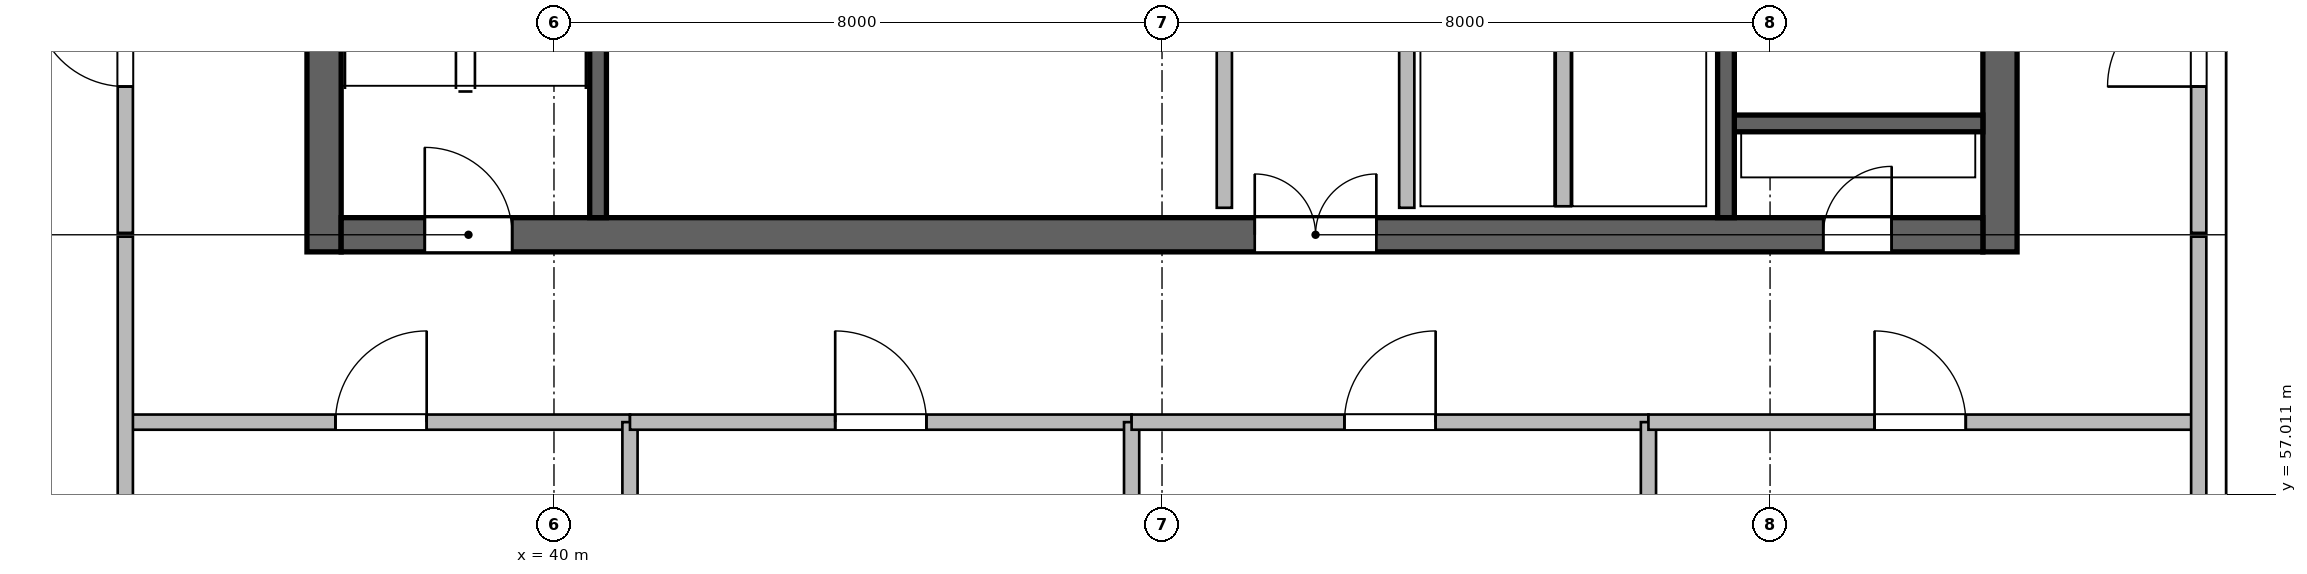
"""IFC4 building model, lengths in metres.
Left out: names, types, materials, properties, quantities, classifications, styles, units other than length and angle.
Written with IfcOpenShell. Run it as: python <this file> out.ifc"""

import sys

from ifc_helpers import new_model, si_unit, direction, frame, frame_2d, origin, place, context, subcontext, project, spatial, rectangle, extrude, source, transform, mapped, element, fill, save


model = new_model("IFC4")
c1 = context("Model", 3, precision=1e-05, world=origin(), true_north=direction((0.0, 1.0)))
c2 = subcontext(c1, "Body", "Model", "MODEL_VIEW")
j1 = project(units=[si_unit("LENGTHUNIT", "METRE"), si_unit("PLANEANGLEUNIT", "RADIAN")], contexts=[c1])
p1 = place(None, origin())
s1 = spatial("IfcSite", under=j1, at=p1, CompositionType="ELEMENT")
p2 = place(p1, origin())
s2 = spatial("IfcBuilding", under=s1, at=p2, CompositionType="ELEMENT")
p3 = place(p2, frame((0.0, 0.0, 189.6)))
s3 = spatial("IfcBuildingStorey", under=s2, at=p3, CompositionType="ELEMENT", Elevation=189.6)
m1 = source(origin(), c2, "Body", "SweptSolid", [
    extrude(rectangle(XDim=12.0, YDim=0.45, at=frame_2d((6.0, 0.0))), origin(), (0.0, 0.0, 1.0), 4.8),
])
for number, where, z_axis, x_axis in (
    (1, (36.975, 60.2, 0.0), (0.0, 0.0, 1.0), (0.0, 1.0, 0.0)),
    (2, (59.025, 60.2, 0.0), (0.0, 0.0, 1.0), (0.0, 1.0, 0.0)),
):
    element("IfcWall", number, at=place(p3, frame(where, z_axis=z_axis, x_axis=x_axis)), inside=s3, PredefinedType="SHEAR", context=c2, shape_type="MappedRepresentation", body=[
        mapped(m1, transform((0.0, 0.0, 0.0), scale=1.0)),
    ])
m2 = source(origin(), c2, "Body", "SweptSolid", [
    extrude(rectangle(XDim=21.6, YDim=0.45, at=frame_2d((10.8, 0.0))), origin(), (0.0, 0.0, 1.0), 4.8),
])
p4 = place(p3, frame((37.2, 60.425, 0.0), z_axis=(0.0, 0.0, 1.0), x_axis=(1.0, 0.0, 0.0)))
e3 = element("IfcWall", 3, at=p4, inside=s3, PredefinedType="SHEAR", context=c2, shape_type="MappedRepresentation", body=[
    mapped(m2, transform((0.0, 0.0, 0.0), scale=1.0)),
])
p5 = place(p4, frame((1.1, 0.0, 0.0)))
e4 = element("IfcOpeningElement", 4, at=p5, cuts=e3, PredefinedType="OPENING", context=c2, shape_type="SweptSolid", body=[
    extrude(rectangle(XDim=1.15, YDim=2.15, at=frame_2d((0.575, 1.075))), frame((0.0, 0.235, 0.0), z_axis=(0.0, -1.0, 0.0), x_axis=(1.0, 0.0, 0.0)), (0.0, 0.0, 1.0), 0.47),
])
p6 = place(p4, frame((19.5, 0.0, 0.0)))
e5 = element("IfcOpeningElement", 5, at=p6, cuts=e3, PredefinedType="OPENING", context=c2, shape_type="SweptSolid", body=[
    extrude(rectangle(XDim=0.9, YDim=2.1, at=frame_2d((0.45, 1.05))), frame((0.0, 0.235, 0.0), z_axis=(0.0, -1.0, 0.0), x_axis=(1.0, 0.0, 0.0)), (0.0, 0.0, 1.0), 0.47),
])
p7 = place(p4, frame((12.02, 0.0, 0.0)))
e6 = element("IfcOpeningElement", 6, at=p7, cuts=e3, PredefinedType="OPENING", context=c2, shape_type="SweptSolid", body=[
    extrude(rectangle(XDim=1.6, YDim=2.15, at=frame_2d((0.8, 1.075))), frame((0.0, 0.235, 0.0), z_axis=(0.0, -1.0, 0.0), x_axis=(1.0, 0.0, 0.0)), (0.0, 0.0, 1.0), 0.47),
])
m3 = source(origin(), c2, "Body", "SweptSolid", [
    extrude(rectangle(XDim=3.27, YDim=0.22, at=frame_2d((1.635, 0.0))), origin(), (0.0, 0.0, 1.0), 4.8),
])
p8 = place(p3, frame((55.53, 61.89, 0.0), z_axis=(0.0, 0.0, 1.0), x_axis=(1.0, 0.0, 0.0)))
e7 = element("IfcWall", 7, at=p8, inside=s3, PredefinedType="SHEAR", context=c2, shape_type="MappedRepresentation", body=[
    mapped(m3, transform((0.0, 0.0, 0.0), scale=1.0)),
])
m4 = source(origin(), c2, "Body", "SweptSolid", [
    extrude(rectangle(XDim=11.1, YDim=0.22, at=frame_2d((5.55, 0.0))), origin(), (0.0, 0.0, 1.0), 4.8),
])
p9 = place(p3, frame((40.58, 60.65, 0.0), z_axis=(0.0, 0.0, 1.0), x_axis=(0.0, 1.0, 0.0)))
e8 = element("IfcWall", 8, at=p9, inside=s3, PredefinedType="SHEAR", context=c2, shape_type="MappedRepresentation", body=[
    mapped(m4, transform((0.0, 0.0, 0.0), scale=1.0)),
])
p10 = place(p3, frame((55.42, 60.65, 0.0), z_axis=(0.0, 0.0, 1.0), x_axis=(0.0, 1.0, 0.0)))
e9 = element("IfcWall", 9, at=p10, inside=s3, PredefinedType="SHEAR", context=c2, shape_type="MappedRepresentation", body=[
    mapped(m4, transform((0.0, 0.0, 0.0), scale=1.0)),
])
p11 = place(p10, frame((9.595, 0.0, 0.0)))
e10 = element("IfcOpeningElement", 10, at=p11, cuts=e9, PredefinedType="OPENING", context=c2, shape_type="SweptSolid", body=[
    extrude(rectangle(XDim=1.15, YDim=2.15, at=frame_2d((0.575, 1.075))), frame((0.0, 0.12, 0.0), z_axis=(0.0, -1.0, 0.0), x_axis=(1.0, 0.0, 0.0)), (0.0, 0.0, 1.0), 0.24),
])
m5 = source(origin(), c2, "Body", "SweptSolid", [
    extrude(rectangle(XDim=2.24, YDim=0.2, at=frame_2d((1.12, 0.0))), origin(), (0.0, 0.0, 1.0), 4.48),
])
for number, where, z_axis, x_axis in (
    (11, (48.82, 60.78, 0.0), (0.0, 0.0, 1.0), (0.0, 1.0, 0.0)),
    (12, (51.22, 60.78, 0.0), (0.0, 0.0, 1.0), (0.0, 1.0, 0.0)),
):
    element("IfcWall", number, at=place(p3, frame(where, z_axis=z_axis, x_axis=x_axis)), inside=s3, PredefinedType="SOLIDWALL", context=c2, shape_type="MappedRepresentation", body=[
        mapped(m5, transform((0.0, 0.0, 0.0), scale=1.0)),
    ])
m6 = source(origin(), c2, "Body", "SweptSolid", [
    extrude(rectangle(XDim=2.2, YDim=0.2, at=frame_2d((1.1, 0.0))), origin(), (0.0, 0.0, 1.0), 4.48),
])
p12 = place(p3, frame((53.28, 60.8, 0.0), z_axis=(0.0, 0.0, 1.0), x_axis=(0.0, 1.0, 0.0)))
e13 = element("IfcWall", 13, at=p12, inside=s3, PredefinedType="SOLIDWALL", context=c2, shape_type="MappedRepresentation", body=[
    mapped(m6, transform((0.0, 0.0, 0.0), scale=1.0)),
])
m7 = source(origin(), c2, "Body", "SweptSolid", [
    extrude(rectangle(XDim=6.55, YDim=0.2, at=frame_2d((3.275, 0.0))), origin(), (0.0, 0.0, 1.0), 4.48),
])
p13 = place(p3, frame((34.45, 57.96, 0.0), z_axis=(0.0, 0.0, 1.0), x_axis=(1.0, 0.0, 0.0)))
e14 = element("IfcWall", 14, at=p13, inside=s3, PredefinedType="SOLIDWALL", context=c2, shape_type="MappedRepresentation", body=[
    mapped(m7, transform((0.0, 0.0, 0.0), scale=1.0)),
])
p14 = place(p13, frame((2.675, 0.0, 0.0)))
e15 = element("IfcOpeningElement", 15, at=p14, cuts=e14, PredefinedType="OPENING", context=c2, shape_type="SweptSolid", body=[
    extrude(rectangle(XDim=1.2, YDim=2.15, at=frame_2d((0.6, 1.075))), frame((0.0, 0.11, 0.0), z_axis=(0.0, -1.0, 0.0), x_axis=(1.0, 0.0, 0.0)), (0.0, 0.0, 1.0), 0.22),
])
m8 = source(origin(), c2, "Body", "SweptSolid", [
    extrude(rectangle(XDim=5.562, YDim=0.2, at=frame_2d((2.781, 0.0))), origin(), (0.0, 0.0, 1.0), 4.48),
])
p15 = place(p3, frame((41.0, 52.398, 0.0), z_axis=(0.0, 0.0, 1.0), x_axis=(0.0, 1.0, 0.0)))
e16 = element("IfcWall", 16, at=p15, inside=s3, PredefinedType="SOLIDWALL", context=c2, shape_type="MappedRepresentation", body=[
    mapped(m8, transform((0.0, 0.0, 0.0), scale=1.0)),
])
m9 = source(origin(), c2, "Body", "SweptSolid", [
    extrude(rectangle(XDim=6.6, YDim=0.2, at=frame_2d((3.3, 0.0))), origin(), (0.0, 0.0, 1.0), 3.925),
])
p16 = place(p3, frame((41.0, 57.96, 0.0), z_axis=(0.0, 0.0, 1.0), x_axis=(1.0, 0.0, 0.0)))
e17 = element("IfcWall", 17, at=p16, inside=s3, PredefinedType="SOLIDWALL", context=c2, shape_type="MappedRepresentation", body=[
    mapped(m9, transform((0.0, 0.0, 0.0), scale=1.0)),
])
p17 = place(p16, frame((2.7, 0.0, 0.0)))
e18 = element("IfcOpeningElement", 18, at=p17, cuts=e17, PredefinedType="OPENING", context=c2, shape_type="SweptSolid", body=[
    extrude(rectangle(XDim=1.2, YDim=2.15, at=frame_2d((0.6, 1.075))), frame((0.0, 0.11, 0.0), z_axis=(0.0, -1.0, 0.0), x_axis=(1.0, 0.0, 0.0)), (0.0, 0.0, 1.0), 0.22),
])
m10 = source(origin(), c2, "Body", "SweptSolid", [
    extrude(rectangle(XDim=4.173, YDim=0.2, at=frame_2d((2.086, 0.0))), origin(), (0.0, 0.0, 1.0), 4.48),
])
p18 = place(p3, frame((47.6, 53.787, 0.0), z_axis=(0.0, 0.0, 1.0), x_axis=(0.0, 1.0, 0.0)))
e19 = element("IfcWall", 19, at=p18, inside=s3, PredefinedType="SOLIDWALL", context=c2, shape_type="MappedRepresentation", body=[
    mapped(m10, transform((0.0, 0.0, 0.0), scale=1.0)),
])
m11 = source(origin(), c2, "Body", "SweptSolid", [
    extrude(rectangle(XDim=6.8, YDim=0.2, at=frame_2d((3.4, 0.0))), origin(), (0.0, 0.0, 1.0), 3.925),
])
p19 = place(p3, frame((47.6, 57.96, 0.0), z_axis=(0.0, 0.0, 1.0), x_axis=(1.0, 0.0, 0.0)))
e20 = element("IfcWall", 20, at=p19, inside=s3, PredefinedType="SOLIDWALL", context=c2, shape_type="MappedRepresentation", body=[
    mapped(m11, transform((0.0, 0.0, 0.0), scale=1.0)),
])
p20 = place(p19, frame((2.8, 0.0, 0.0)))
e21 = element("IfcOpeningElement", 21, at=p20, cuts=e20, PredefinedType="OPENING", context=c2, shape_type="SweptSolid", body=[
    extrude(rectangle(XDim=1.2, YDim=2.15, at=frame_2d((0.6, 1.075))), frame((0.0, 0.11, 0.0), z_axis=(0.0, -1.0, 0.0), x_axis=(1.0, 0.0, 0.0)), (0.0, 0.0, 1.0), 0.22),
])
m12 = source(origin(), c2, "Body", "SweptSolid", [
    extrude(rectangle(XDim=5.354, YDim=0.2, at=frame_2d((2.677, 0.0))), origin(), (0.0, 0.0, 1.0), 4.48),
])
p21 = place(p3, frame((54.4, 52.606, 0.0), z_axis=(0.0, 0.0, 1.0), x_axis=(0.0, 1.0, 0.0)))
e22 = element("IfcWall", 22, at=p21, inside=s3, PredefinedType="SOLIDWALL", context=c2, shape_type="MappedRepresentation", body=[
    mapped(m12, transform((0.0, 0.0, 0.0), scale=1.0)),
])
m13 = source(origin(), c2, "Body", "SweptSolid", [
    extrude(rectangle(XDim=7.15, YDim=0.2, at=frame_2d((3.575, 0.0))), origin(), (0.0, 0.0, 1.0), 3.925),
])
p22 = place(p3, frame((54.4, 57.96, 0.0), z_axis=(0.0, 0.0, 1.0), x_axis=(1.0, 0.0, 0.0)))
e23 = element("IfcWall", 23, at=p22, inside=s3, PredefinedType="SOLIDWALL", context=c2, shape_type="MappedRepresentation", body=[
    mapped(m13, transform((0.0, 0.0, 0.0), scale=1.0)),
])
p23 = place(p22, frame((2.975, 0.0, 0.0)))
e24 = element("IfcOpeningElement", 24, at=p23, cuts=e23, PredefinedType="OPENING", context=c2, shape_type="SweptSolid", body=[
    extrude(rectangle(XDim=1.2, YDim=2.15, at=frame_2d((0.6, 1.075))), frame((0.0, 0.11, 0.0), z_axis=(0.0, -1.0, 0.0), x_axis=(1.0, 0.0, 0.0)), (0.0, 0.0, 1.0), 0.22),
])
m14 = source(origin(), c2, "Body", "SweptSolid", [
    extrude(rectangle(XDim=12.336, YDim=0.2, at=frame_2d((6.168, 0.0))), origin(), (0.0, 0.0, 1.0), 4.48),
])
p24 = place(p3, frame((34.36, 48.064, 0.0), z_axis=(0.0, 0.0, 1.0), x_axis=(0.0, 1.0, 0.0)))
e25 = element("IfcWall", 25, at=p24, inside=s3, PredefinedType="SOLIDWALL", context=c2, shape_type="MappedRepresentation", body=[
    mapped(m14, transform((0.0, 0.0, 0.0), scale=1.0)),
])
m15 = source(origin(), c2, "Body", "SweptSolid", [
    extrude(rectangle(XDim=5.05, YDim=0.2, at=frame_2d((2.525, 0.0))), origin(), (0.0, 0.0, 1.0), 4.48),
])
p25 = place(p3, frame((34.36, 60.45, 0.0), z_axis=(0.0, 0.0, 1.0), x_axis=(0.0, 1.0, 0.0)))
e26 = element("IfcWall", 26, at=p25, inside=s3, PredefinedType="SOLIDWALL", context=c2, shape_type="MappedRepresentation", body=[
    mapped(m15, transform((0.0, 0.0, 0.0), scale=1.0)),
])
p26 = place(p25, frame((1.925, 0.0, 0.0)))
e27 = element("IfcOpeningElement", 27, at=p26, cuts=e26, PredefinedType="OPENING", context=c2, shape_type="SweptSolid", body=[
    extrude(rectangle(XDim=1.2, YDim=2.15, at=frame_2d((0.6, 1.075))), frame((0.0, 0.11, 0.0), z_axis=(0.0, -1.0, 0.0), x_axis=(1.0, 0.0, 0.0)), (0.0, 0.0, 1.0), 0.22),
])
m16 = source(origin(), c2, "Body", "SweptSolid", [
    extrude(rectangle(XDim=12.336, YDim=0.2, at=frame_2d((6.168, 0.0))), origin(), (0.0, 0.0, 1.0), 3.772),
])
p27 = place(p3, frame((61.64, 48.064, 0.0), z_axis=(0.0, 0.0, 1.0), x_axis=(0.0, 1.0, 0.0)))
e28 = element("IfcWall", 28, at=p27, inside=s3, PredefinedType="SOLIDWALL", context=c2, shape_type="MappedRepresentation", body=[
    mapped(m16, transform((0.0, 0.0, 0.0), scale=1.0)),
])
p28 = place(p3, frame((61.64, 60.45, 0.0), z_axis=(0.0, 0.0, 1.0), x_axis=(0.0, 1.0, 0.0)))
e29 = element("IfcWall", 29, at=p28, inside=s3, PredefinedType="SOLIDWALL", context=c2, shape_type="MappedRepresentation", body=[
    mapped(m15, transform((0.0, 0.0, 0.0), scale=1.0)),
])
p29 = place(p28, frame((1.925, 0.0, 0.0)))
e30 = element("IfcOpeningElement", 30, at=p29, cuts=e29, PredefinedType="OPENING", context=c2, shape_type="SweptSolid", body=[
    extrude(rectangle(XDim=1.2, YDim=2.15, at=frame_2d((0.6, 1.075))), frame((0.0, 0.11, 0.0), z_axis=(0.0, -1.0, 0.0), x_axis=(1.0, 0.0, 0.0)), (0.0, 0.0, 1.0), 0.22),
])
m17 = source(origin(), c2, "Body", "SweptSolid", [
    extrude(rectangle(XDim=1.15, YDim=2.15, at=frame_2d((0.575, 1.075))), frame((0.0, 0.025, 0.0), z_axis=(0.0, -1.0, 0.0), x_axis=(1.0, 0.0, 0.0)), (0.0, 0.0, 1.0), 0.05),
])
p30 = place(p5, origin())
e31 = element("IfcDoor", 31, at=p30, inside=s3, OperationType="SINGLE_SWING_LEFT", PredefinedType="DOOR", context=c2, shape_type="MappedRepresentation", body=[
    mapped(m17, transform((0.0, 0.0, 0.0), scale=1.0)),
])
fill(e4, e31)
m18 = source(origin(), c2, "Body", "SweptSolid", [
    extrude(rectangle(XDim=0.9, YDim=2.1, at=frame_2d((0.45, 1.05))), frame((0.0, 0.025, 0.0), z_axis=(0.0, -1.0, 0.0), x_axis=(1.0, 0.0, 0.0)), (0.0, 0.0, 1.0), 0.05),
])
p31 = place(p6, origin())
e32 = element("IfcDoor", 32, at=p31, inside=s3, OperationType="SINGLE_SWING_RIGHT", PredefinedType="DOOR", context=c2, shape_type="MappedRepresentation", body=[
    mapped(m18, transform((0.0, 0.0, 0.0), scale=1.0)),
])
fill(e5, e32)
m19 = source(origin(), c2, "Body", "SweptSolid", [
    extrude(rectangle(XDim=1.6, YDim=2.15, at=frame_2d((0.8, 1.075))), frame((0.0, 0.025, 0.0), z_axis=(0.0, -1.0, 0.0), x_axis=(1.0, 0.0, 0.0)), (0.0, 0.0, 1.0), 0.05),
])
p32 = place(p7, origin())
e33 = element("IfcDoor", 33, at=p32, inside=s3, OperationType="DOUBLE_DOOR_SINGLE_SWING", PredefinedType="DOOR", context=c2, shape_type="MappedRepresentation", body=[
    mapped(m19, transform((0.0, 0.0, 0.0), scale=1.0)),
])
fill(e6, e33)
m20 = source(origin(), c2, "Body", "SweptSolid", [
    extrude(rectangle(XDim=1.2, YDim=2.15, at=frame_2d((0.6, 1.075))), frame((0.0, 0.025, 0.0), z_axis=(0.0, -1.0, 0.0), x_axis=(1.0, 0.0, 0.0)), (0.0, 0.0, 1.0), 0.05),
])
p33 = place(p14, origin())
e34 = element("IfcDoor", 34, at=p33, inside=s3, OperationType="SINGLE_SWING_RIGHT", PredefinedType="DOOR", context=c2, shape_type="MappedRepresentation", body=[
    mapped(m20, transform((0.0, 0.0, 0.0), scale=1.0)),
])
fill(e15, e34)
p34 = place(p17, origin())
e35 = element("IfcDoor", 35, at=p34, inside=s3, OperationType="SINGLE_SWING_LEFT", PredefinedType="DOOR", context=c2, shape_type="MappedRepresentation", body=[
    mapped(m20, transform((0.0, 0.0, 0.0), scale=1.0)),
])
fill(e18, e35)
p35 = place(p20, origin())
e36 = element("IfcDoor", 36, at=p35, inside=s3, OperationType="SINGLE_SWING_RIGHT", PredefinedType="DOOR", context=c2, shape_type="MappedRepresentation", body=[
    mapped(m20, transform((0.0, 0.0, 0.0), scale=1.0)),
])
fill(e21, e36)
p36 = place(p23, origin())
e37 = element("IfcDoor", 37, at=p36, inside=s3, OperationType="SINGLE_SWING_LEFT", PredefinedType="DOOR", context=c2, shape_type="MappedRepresentation", body=[
    mapped(m20, transform((0.0, 0.0, 0.0), scale=1.0)),
])
fill(e24, e37)
p37 = place(p26, origin())
e38 = element("IfcDoor", 38, at=p37, inside=s3, OperationType="SINGLE_SWING_RIGHT", PredefinedType="DOOR", context=c2, shape_type="MappedRepresentation", body=[
    mapped(m20, transform((0.0, 0.0, 0.0), scale=1.0)),
])
fill(e27, e38)
p38 = place(p29, origin())
e39 = element("IfcDoor", 39, at=p38, inside=s3, OperationType="SINGLE_SWING_LEFT", PredefinedType="DOOR", context=c2, shape_type="MappedRepresentation", body=[
    mapped(m20, transform((0.0, 0.0, 0.0), scale=1.0)),
])
fill(e30, e39)
save(model, sys.argv[1])
